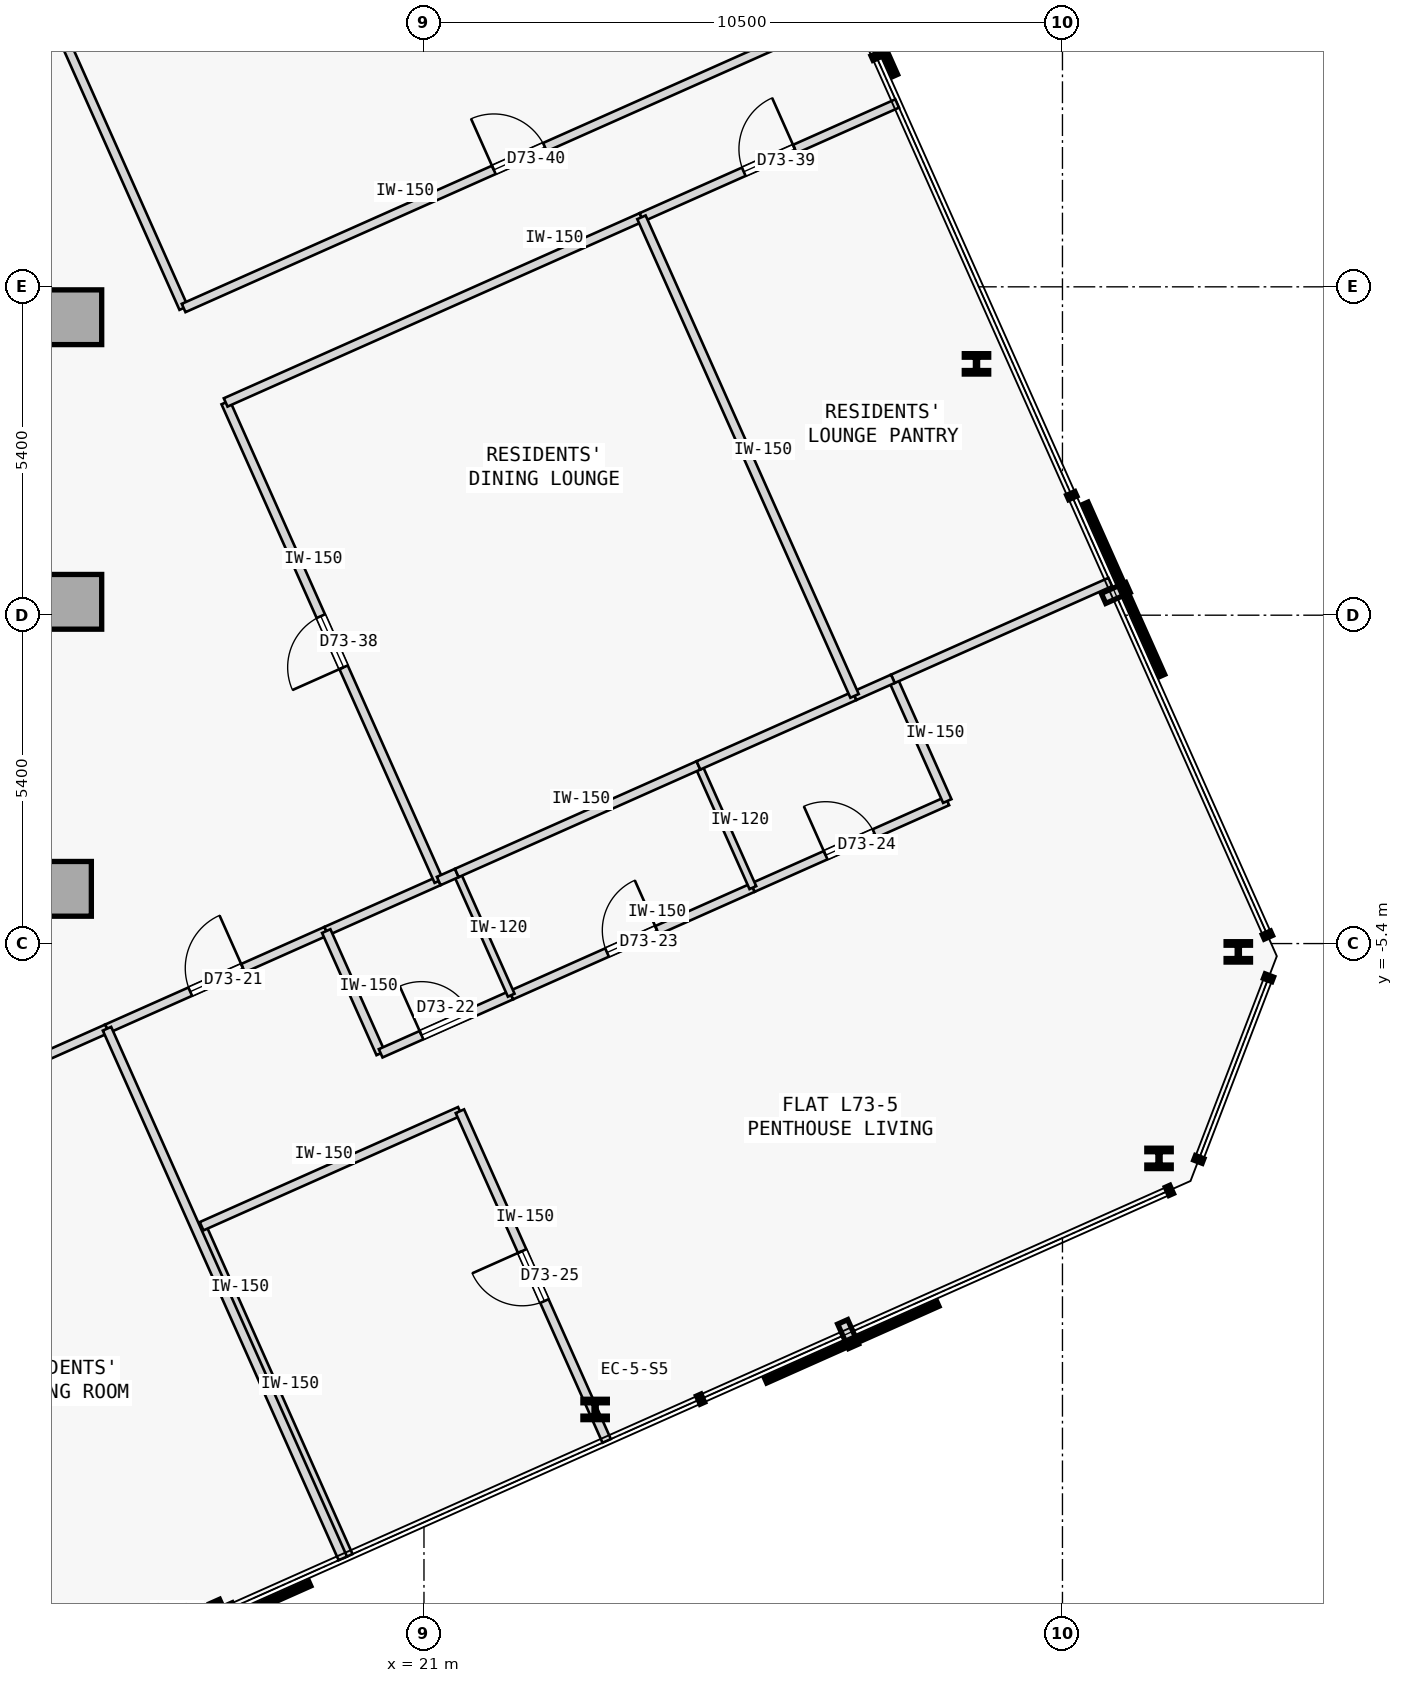
"""IFC4 building model, lengths in metres.
Left out: names, types, materials, properties, quantities, classifications, styles, units other than length and angle.
Written with IfcOpenShell. Run it as: python <this file> out.ifc"""

import sys

from ifc_helpers import new_model, si_unit, direction, frame, frame_2d, origin, origin_2d, place, context, subcontext, project, spatial, rectangle, i_section, extrude, element, fill, save


model = new_model("IFC4")
c1 = context("Model", 3, precision=1e-05, world=origin(), true_north=direction((0.0, 1.0)))
c2 = subcontext(c1, "Body", "Model", "MODEL_VIEW")
j1 = project(units=[si_unit("LENGTHUNIT", "METRE"), si_unit("PLANEANGLEUNIT", "RADIAN")], contexts=[c1])
p1 = place(None, origin())
s1 = spatial("IfcSite", under=j1, at=p1, CompositionType="ELEMENT")
p2 = place(p1, origin())
s2 = spatial("IfcBuilding", under=s1, at=p2, CompositionType="ELEMENT")
p3 = place(p2, frame((0.0, 0.0, 272.25)))
s3 = spatial("IfcBuildingStorey", under=s2, at=p3, CompositionType="ELEMENT", Elevation=272.25)
for number, where, z_axis, x_axis in (
    (1, (15.25, 4.9, 0.0), (0.0, 0.0, 1.0), (1.0, 0.0, 0.0)),
    (2, (15.25, 0.22, 0.0), (0.0, 0.0, 1.0), (1.0, 0.0, 0.0)),
    (3, (15.08, -4.5, 0.0), (0.0, 0.0, 1.0), (1.0, 0.0, 0.0)),
):
    element("IfcColumn", number, at=place(p3, frame(where, z_axis=z_axis, x_axis=x_axis)), inside=s3, PredefinedType="COLUMN", context=c2, shape_type="SweptSolid", body=[
        extrude(rectangle(XDim=0.9, YDim=0.9, at=origin_2d()), origin(), (0.0, 0.0, 1.0), 3.35),
    ])
for number, where, z_axis, x_axis in (
    (4, (23.814, -13.062, 0.0), (0.0, 0.0, 1.0), (1.0, 0.0, 0.0)),
    (5, (33.088, -8.933, 0.0), (0.0, 0.0, 1.0), (1.0, 0.0, 0.0)),
    (6, (34.392, -5.537, 0.0), (0.0, 0.0, 1.0), (1.0, 0.0, 0.0)),
    (7, (30.086, 4.133, 0.0), (0.0, 0.0, 1.0), (1.0, 0.0, 0.0)),
):
    element("IfcColumn", number, at=place(p3, frame(where, z_axis=z_axis, x_axis=x_axis)), inside=s3, PredefinedType="COLUMN", context=c2, shape_type="SweptSolid", body=[
        extrude(i_section(OverallWidth=0.401, OverallDepth=0.335, WebThickness=0.036, FlangeThickness=0.058, FilletRadius=0.015, at=origin_2d()), origin(), (0.0, 0.0, 1.0), 3.35),
    ])
p4 = place(p3, frame((15.787, -6.8, 0.0), z_axis=(0.0, 0.0, 1.0), x_axis=(0.913558844356, 0.406706574693, 0.0)))
e8 = element("IfcWall", 8, at=p4, inside=s3, PredefinedType="PARTITIONING", context=c2, shape_type="SweptSolid", body=[
    extrude(rectangle(XDim=3.947, YDim=0.15, at=frame_2d((1.973, 0.0))), origin(), (0.0, 0.0, 1.0), 3.1),
])
p5 = place(p4, frame((1.499, 0.0, 0.0)))
e9 = element("IfcOpeningElement", 9, at=p5, cuts=e8, PredefinedType="OPENING", context=c2, shape_type="SweptSolid", body=[
    extrude(rectangle(XDim=0.95, YDim=2.15, at=frame_2d((0.475, 1.075))), frame((0.0, 0.085, 0.0), z_axis=(0.0, -1.0, 0.0), x_axis=(1.0, 0.0, 0.0)), (0.0, 0.0, 1.0), 0.17),
])
p6 = place(p3, frame((19.393, -5.195, 0.0), z_axis=(0.0, 0.0, 1.0), x_axis=(0.91354290336, 0.406742380039, 0.0)))
e10 = element("IfcWall", 10, at=p6, inside=s3, PredefinedType="PARTITIONING", context=c2, shape_type="SweptSolid", body=[
    extrude(rectangle(XDim=2.025, YDim=0.15, at=frame_2d((1.013, 0.0))), origin(), (0.0, 0.0, 1.0), 3.1),
])
p7 = place(p3, frame((10.18, -9.297, 0.0), z_axis=(0.0, 0.0, 1.0), x_axis=(0.913545641557, 0.406736229997, 0.0)))
e11 = element("IfcWall", 11, at=p7, inside=s3, PredefinedType="PARTITIONING", context=c2, shape_type="SweptSolid", body=[
    extrude(rectangle(XDim=6.138, YDim=0.15, at=frame_2d((3.069, 0.0))), origin(), (0.0, 0.0, 1.0), 3.1),
])
p8 = place(p7, frame((2.609, 0.0, 0.0)))
e12 = element("IfcOpeningElement", 12, at=p8, cuts=e11, PredefinedType="OPENING", context=c2, shape_type="SweptSolid", body=[
    extrude(rectangle(XDim=0.92, YDim=2.15, at=frame_2d((0.46, 1.075))), frame((0.0, 0.085, 0.0), z_axis=(0.0, -1.0, 0.0), x_axis=(1.0, 0.0, 0.0)), (0.0, 0.0, 1.0), 0.17),
])
p9 = place(p3, frame((21.243, -4.371, 0.0), z_axis=(0.0, 0.0, 1.0), x_axis=(-0.406751025101, 0.913539054217, 0.0)))
e13 = element("IfcWall", 13, at=p9, inside=s3, PredefinedType="PARTITIONING", context=c2, shape_type="SweptSolid", body=[
    extrude(rectangle(XDim=8.615, YDim=0.15, at=frame_2d((4.308, 0.0))), origin(), (0.0, 0.0, 1.0), 3.1),
])
p10 = place(p9, frame((3.847, 0.0, 0.0)))
e14 = element("IfcOpeningElement", 14, at=p10, cuts=e13, PredefinedType="OPENING", context=c2, shape_type="SweptSolid", body=[
    extrude(rectangle(XDim=0.92, YDim=2.15, at=frame_2d((0.46, 1.075))), frame((0.0, 0.085, 0.0), z_axis=(0.0, -1.0, 0.0), x_axis=(1.0, 0.0, 0.0)), (0.0, 0.0, 1.0), 0.17),
])
p11 = place(p3, frame((17.739, 3.499, 0.0), z_axis=(0.0, 0.0, 1.0), x_axis=(0.913545033673, 0.406737595326, 0.0)))
e15 = element("IfcWall", 15, at=p11, inside=s3, PredefinedType="PARTITIONING", context=c2, shape_type="SweptSolid", body=[
    extrude(rectangle(XDim=7.485, YDim=0.15, at=frame_2d((3.743, 0.0))), origin(), (0.0, 0.0, 1.0), 3.1),
])
p12 = place(p3, frame((24.577, 6.543, 0.0), z_axis=(0.0, 0.0, 1.0), x_axis=(0.913537946403, 0.406753513177, 0.0)))
e16 = element("IfcWall", 16, at=p12, inside=s3, PredefinedType="PARTITIONING", context=c2, shape_type="SweptSolid", body=[
    extrude(rectangle(XDim=4.603, YDim=0.15, at=frame_2d((2.302, 0.0))), origin(), (0.0, 0.0, 1.0), 3.1),
])
p13 = place(p12, frame((1.842, 0.0, 0.0)))
e17 = element("IfcOpeningElement", 17, at=p13, cuts=e16, PredefinedType="OPENING", context=c2, shape_type="SweptSolid", body=[
    extrude(rectangle(XDim=0.92, YDim=2.15, at=frame_2d((0.46, 1.075))), frame((0.0, 0.085, 0.0), z_axis=(0.0, -1.0, 0.0), x_axis=(1.0, 0.0, 0.0)), (0.0, 0.0, 1.0), 0.17),
])
p14 = place(p3, frame((17.047, 5.052, 0.0), z_axis=(0.0, 0.0, 1.0), x_axis=(-0.406752543172, 0.913538378298, 0.0)))
e18 = element("IfcWall", 18, at=p14, inside=s3, PredefinedType="PARTITIONING", context=c2, shape_type="SweptSolid", body=[
    extrude(rectangle(XDim=7.561, YDim=0.15, at=frame_2d((3.781, 0.0))), origin(), (0.0, 0.0, 1.0), 3.1),
])
p15 = place(p3, frame((17.047, 5.052, 0.0), z_axis=(0.0, 0.0, 1.0), x_axis=(0.913549839503, 0.406726801113, 0.0)))
e19 = element("IfcWall", 19, at=p15, inside=s3, PredefinedType="PARTITIONING", context=c2, shape_type="SweptSolid", body=[
    extrude(rectangle(XDim=12.088, YDim=0.15, at=frame_2d((6.044, 0.0))), origin(), (0.0, 0.0, 1.0), 3.1),
])
p16 = place(p15, frame((5.584, 0.0, 0.0)))
e20 = element("IfcOpeningElement", 20, at=p16, cuts=e19, PredefinedType="OPENING", context=c2, shape_type="SweptSolid", body=[
    extrude(rectangle(XDim=0.92, YDim=2.15, at=frame_2d((0.46, 1.075))), frame((0.0, 0.085, 0.0), z_axis=(0.0, -1.0, 0.0), x_axis=(1.0, 0.0, 0.0)), (0.0, 0.0, 1.0), 0.17),
])
p17 = place(p3, frame((20.288, -7.205, 0.0), z_axis=(0.0, 0.0, 1.0), x_axis=(-0.406817905151, 0.913509273105, 0.0)))
e21 = element("IfcWall", 21, at=p17, inside=s3, PredefinedType="PARTITIONING", context=c2, shape_type="SweptSolid", body=[
    extrude(rectangle(XDim=2.2, YDim=0.15, at=frame_2d((1.1, 0.0))), origin(), (0.0, 0.0, 1.0), 3.1),
])
p18 = place(p3, frame((20.288, -7.205, 0.0), z_axis=(0.0, 0.0, 1.0), x_axis=(0.913541436194, 0.406745675276, 0.0)))
e22 = element("IfcWall", 22, at=p18, inside=s3, PredefinedType="PARTITIONING", context=c2, shape_type="SweptSolid", body=[
    extrude(rectangle(XDim=2.35, YDim=0.15, at=frame_2d((1.175, 0.0))), origin(), (0.0, 0.0, 1.0), 3.1),
])
p19 = place(p18, frame((0.735, 0.0, 0.0)))
e23 = element("IfcOpeningElement", 23, at=p19, cuts=e22, PredefinedType="OPENING", context=c2, shape_type="SweptSolid", body=[
    extrude(rectangle(XDim=0.88, YDim=2.15, at=frame_2d((0.44, 1.075))), frame((0.0, 0.085, 0.0), z_axis=(0.0, -1.0, 0.0), x_axis=(1.0, 0.0, 0.0)), (0.0, 0.0, 1.0), 0.17),
])
p20 = place(p3, frame((22.435, -6.249, 0.0), z_axis=(0.0, 0.0, 1.0), x_axis=(0.913545193015, 0.406737237438, 0.0)))
e24 = element("IfcWall", 24, at=p20, inside=s3, PredefinedType="PARTITIONING", context=c2, shape_type="SweptSolid", body=[
    extrude(rectangle(XDim=4.35, YDim=0.15, at=frame_2d((2.175, 0.0))), origin(), (0.0, 0.0, 1.0), 3.1),
])
p21 = place(p20, frame((1.725, 0.0, 0.0)))
e25 = element("IfcOpeningElement", 25, at=p21, cuts=e24, PredefinedType="OPENING", context=c2, shape_type="SweptSolid", body=[
    extrude(rectangle(XDim=0.9, YDim=2.15, at=frame_2d((0.45, 1.075))), frame((0.0, 0.085, 0.0), z_axis=(0.0, -1.0, 0.0), x_axis=(1.0, 0.0, 0.0)), (0.0, 0.0, 1.0), 0.17),
])
p22 = place(p3, frame((26.408, -4.48, 0.0), z_axis=(0.0, 0.0, 1.0), x_axis=(0.913549606868, 0.406727323635, 0.0)))
e26 = element("IfcWall", 26, at=p22, inside=s3, PredefinedType="PARTITIONING", context=c2, shape_type="SweptSolid", body=[
    extrude(rectangle(XDim=3.5, YDim=0.15, at=frame_2d((1.75, 0.0))), origin(), (0.0, 0.0, 1.0), 3.1),
])
p23 = place(p22, frame((1.31, 0.0, 0.0)))
e27 = element("IfcOpeningElement", 27, at=p23, cuts=e26, PredefinedType="OPENING", context=c2, shape_type="SweptSolid", body=[
    extrude(rectangle(XDim=0.88, YDim=2.15, at=frame_2d((0.44, 1.075))), frame((0.0, 0.085, 0.0), z_axis=(0.0, -1.0, 0.0), x_axis=(1.0, 0.0, 0.0)), (0.0, 0.0, 1.0), 0.17),
])
p24 = place(p3, frame((29.606, -3.056, 0.0), z_axis=(0.0, 0.0, 1.0), x_axis=(-0.406725294076, 0.913550510459, 0.0)))
e28 = element("IfcWall", 28, at=p24, inside=s3, PredefinedType="PARTITIONING", context=c2, shape_type="SweptSolid", body=[
    extrude(rectangle(XDim=2.2, YDim=0.15, at=frame_2d((1.1, 0.0))), origin(), (0.0, 0.0, 1.0), 3.1),
])
p25 = place(p3, frame((19.757, -15.47, 0.0), z_axis=(0.0, 0.0, 1.0), x_axis=(-0.406749048544, 0.913539934271, 0.0)))
e29 = element("IfcWall", 29, at=p25, inside=s3, PredefinedType="PARTITIONING", context=c2, shape_type="SweptSolid", body=[
    extrude(rectangle(XDim=5.935, YDim=0.15, at=frame_2d((2.968, 0.0))), origin(), (0.0, 0.0, 1.0), 3.1),
])
p26 = place(p3, frame((17.343, -10.049, 0.0), z_axis=(0.0, 0.0, 1.0), x_axis=(0.913525541207, 0.406781373176, 0.0)))
e30 = element("IfcWall", 30, at=p26, inside=s3, PredefinedType="PARTITIONING", context=c2, shape_type="SweptSolid", body=[
    extrude(rectangle(XDim=4.65, YDim=0.15, at=frame_2d((2.325, 0.0))), origin(), (0.0, 0.0, 1.0), 3.1),
])
p27 = place(p3, frame((24.005, -13.579, 0.0), z_axis=(0.0, 0.0, 1.0), x_axis=(-0.406733763825, 0.913546739562, 0.0)))
e31 = element("IfcWall", 31, at=p27, inside=s3, PredefinedType="PARTITIONING", context=c2, shape_type="SweptSolid", body=[
    extrude(rectangle(XDim=5.935, YDim=0.15, at=frame_2d((2.968, 0.0))), origin(), (0.0, 0.0, 1.0), 3.1),
])
p28 = place(p27, frame((2.518, 0.0, 0.0)))
e32 = element("IfcOpeningElement", 32, at=p28, cuts=e31, PredefinedType="OPENING", context=c2, shape_type="SweptSolid", body=[
    extrude(rectangle(XDim=0.9, YDim=2.15, at=frame_2d((0.45, 1.075))), frame((0.0, 0.085, 0.0), z_axis=(0.0, -1.0, 0.0), x_axis=(1.0, 0.0, 0.0)), (0.0, 0.0, 1.0), 0.17),
])
p29 = place(p3, frame((19.665, -15.511, 0.0), z_axis=(0.0, 0.0, 1.0), x_axis=(-0.406729927653, 0.913548447512, 0.0)))
e33 = element("IfcWall", 33, at=p29, inside=s3, PredefinedType="PARTITIONING", context=c2, shape_type="SweptSolid", body=[
    extrude(rectangle(XDim=9.535, YDim=0.15, at=frame_2d((4.768, 0.0))), origin(), (0.0, 0.0, 1.0), 3.1),
])
p30 = place(p3, frame((28.711, -1.046, 0.0), z_axis=(0.0, 0.0, 1.0), x_axis=(0.913523164096, 0.406786711508, 0.0)))
e34 = element("IfcWall", 34, at=p30, inside=s3, PredefinedType="PARTITIONING", context=c2, shape_type="SweptSolid", body=[
    extrude(rectangle(XDim=3.913, YDim=0.15, at=frame_2d((1.957, 0.0))), origin(), (0.0, 0.0, 1.0), 3.1),
])
p31 = place(p3, frame((22.435, -6.249, 0.0), z_axis=(0.0, 0.0, 1.0), x_axis=(-0.406725294076, 0.913550510459, 0.0)))
e35 = element("IfcWall", 35, at=p31, inside=s3, PredefinedType="PARTITIONING", context=c2, shape_type="SweptSolid", body=[
    extrude(rectangle(XDim=2.2, YDim=0.12, at=frame_2d((1.1, 0.0))), origin(), (0.0, 0.0, 1.0), 3.1),
])
p32 = place(p3, frame((21.243, -4.371, 0.0), z_axis=(0.0, 0.0, 1.0), x_axis=(0.913656562077, 0.406487006648, 0.0)))
e36 = element("IfcWall", 36, at=p32, inside=s3, PredefinedType="PARTITIONING", context=c2, shape_type="SweptSolid", body=[
    extrude(rectangle(XDim=0.325, YDim=0.15, at=frame_2d((0.163, 0.0))), origin(), (0.0, 0.0, 1.0), 3.1),
])
p33 = place(p3, frame((26.408, -4.48, 0.0), z_axis=(0.0, 0.0, 1.0), x_axis=(-0.406725294076, 0.913550510459, 0.0)))
e37 = element("IfcWall", 37, at=p33, inside=s3, PredefinedType="PARTITIONING", context=c2, shape_type="SweptSolid", body=[
    extrude(rectangle(XDim=2.2, YDim=0.12, at=frame_2d((1.1, 0.0))), origin(), (0.0, 0.0, 1.0), 3.1),
])
p34 = place(p3, frame((21.54, -4.239, 0.0), z_axis=(0.0, 0.0, 1.0), x_axis=(0.913545193015, 0.406737237438, 0.0)))
e38 = element("IfcWall", 38, at=p34, inside=s3, PredefinedType="PARTITIONING", context=c2, shape_type="SweptSolid", body=[
    extrude(rectangle(XDim=4.35, YDim=0.15, at=frame_2d((2.175, 0.0))), origin(), (0.0, 0.0, 1.0), 3.1),
])
p35 = place(p3, frame((25.514, -2.47, 0.0), z_axis=(0.0, 0.0, 1.0), x_axis=(0.913531886701, 0.406767122542, 0.0)))
e39 = element("IfcWall", 39, at=p35, inside=s3, PredefinedType="PARTITIONING", context=c2, shape_type="SweptSolid", body=[
    extrude(rectangle(XDim=2.81, YDim=0.15, at=frame_2d((1.405, 0.0))), origin(), (0.0, 0.0, 1.0), 3.1),
])
p36 = place(p3, frame((28.081, -1.327, 0.0), z_axis=(0.0, 0.0, 1.0), x_axis=(0.9136217601, 0.406565221671, 0.0)))
e40 = element("IfcWall", 40, at=p36, inside=s3, PredefinedType="PARTITIONING", context=c2, shape_type="SweptSolid", body=[
    extrude(rectangle(XDim=0.69, YDim=0.15, at=frame_2d((0.345, 0.0))), origin(), (0.0, 0.0, 1.0), 3.1),
])
p37 = place(p3, frame((28.081, -1.327, 0.0), z_axis=(0.0, 0.0, 1.0), x_axis=(-0.406751025101, 0.913539054217, 0.0)))
e41 = element("IfcWall", 41, at=p37, inside=s3, PredefinedType="PARTITIONING", context=c2, shape_type="SweptSolid", body=[
    extrude(rectangle(XDim=8.615, YDim=0.15, at=frame_2d((4.308, 0.0))), origin(), (0.0, 0.0, 1.0), 3.1),
])
p38 = place(p5, origin())
e42 = element("IfcDoor", 42, at=p38, inside=s3, OperationType="SINGLE_SWING_RIGHT", PredefinedType="DOOR", context=c2, shape_type="SweptSolid", body=[
    extrude(rectangle(XDim=0.95, YDim=2.15, at=frame_2d((0.475, 1.075))), frame((0.0, 0.025, 0.0), z_axis=(0.0, -1.0, 0.0), x_axis=(1.0, 0.0, 0.0)), (0.0, 0.0, 1.0), 0.05),
])
fill(e9, e42)
p39 = place(p19, origin())
e43 = element("IfcDoor", 43, at=p39, inside=s3, OperationType="SINGLE_SWING_LEFT", PredefinedType="DOOR", context=c2, shape_type="SweptSolid", body=[
    extrude(rectangle(XDim=0.88, YDim=2.15, at=frame_2d((0.44, 1.075))), frame((0.0, 0.025, 0.0), z_axis=(0.0, -1.0, 0.0), x_axis=(1.0, 0.0, 0.0)), (0.0, 0.0, 1.0), 0.05),
])
fill(e23, e43)
p40 = place(p21, origin())
e44 = element("IfcDoor", 44, at=p40, inside=s3, OperationType="SINGLE_SWING_RIGHT", PredefinedType="DOOR", context=c2, shape_type="SweptSolid", body=[
    extrude(rectangle(XDim=0.9, YDim=2.15, at=frame_2d((0.45, 1.075))), frame((0.0, 0.025, 0.0), z_axis=(0.0, -1.0, 0.0), x_axis=(1.0, 0.0, 0.0)), (0.0, 0.0, 1.0), 0.05),
])
fill(e25, e44)
p41 = place(p23, origin())
e45 = element("IfcDoor", 45, at=p41, inside=s3, OperationType="SINGLE_SWING_LEFT", PredefinedType="DOOR", context=c2, shape_type="SweptSolid", body=[
    extrude(rectangle(XDim=0.88, YDim=2.15, at=frame_2d((0.44, 1.075))), frame((0.0, 0.025, 0.0), z_axis=(0.0, -1.0, 0.0), x_axis=(1.0, 0.0, 0.0)), (0.0, 0.0, 1.0), 0.05),
])
fill(e27, e45)
p42 = place(p28, origin())
e46 = element("IfcDoor", 46, at=p42, inside=s3, OperationType="SINGLE_SWING_RIGHT", PredefinedType="DOOR", context=c2, shape_type="SweptSolid", body=[
    extrude(rectangle(XDim=0.9, YDim=2.15, at=frame_2d((0.45, 1.075))), frame((0.0, 0.025, 0.0), z_axis=(0.0, -1.0, 0.0), x_axis=(1.0, 0.0, 0.0)), (0.0, 0.0, 1.0), 0.05),
])
fill(e32, e46)
p43 = place(p10, origin())
e47 = element("IfcDoor", 47, at=p43, inside=s3, OperationType="SINGLE_SWING_LEFT", PredefinedType="DOOR", context=c2, shape_type="SweptSolid", body=[
    extrude(rectangle(XDim=0.92, YDim=2.15, at=frame_2d((0.46, 1.075))), frame((0.0, 0.025, 0.0), z_axis=(0.0, -1.0, 0.0), x_axis=(1.0, 0.0, 0.0)), (0.0, 0.0, 1.0), 0.05),
])
fill(e14, e47)
p44 = place(p13, origin())
e48 = element("IfcDoor", 48, at=p44, inside=s3, OperationType="SINGLE_SWING_RIGHT", PredefinedType="DOOR", context=c2, shape_type="SweptSolid", body=[
    extrude(rectangle(XDim=0.92, YDim=2.15, at=frame_2d((0.46, 1.075))), frame((0.0, 0.025, 0.0), z_axis=(0.0, -1.0, 0.0), x_axis=(1.0, 0.0, 0.0)), (0.0, 0.0, 1.0), 0.05),
])
fill(e17, e48)
p45 = place(p16, origin())
e49 = element("IfcDoor", 49, at=p45, inside=s3, OperationType="SINGLE_SWING_LEFT", PredefinedType="DOOR", context=c2, shape_type="SweptSolid", body=[
    extrude(rectangle(XDim=0.92, YDim=2.15, at=frame_2d((0.46, 1.075))), frame((0.0, 0.025, 0.0), z_axis=(0.0, -1.0, 0.0), x_axis=(1.0, 0.0, 0.0)), (0.0, 0.0, 1.0), 0.05),
])
fill(e20, e49)
save(model, sys.argv[1])
